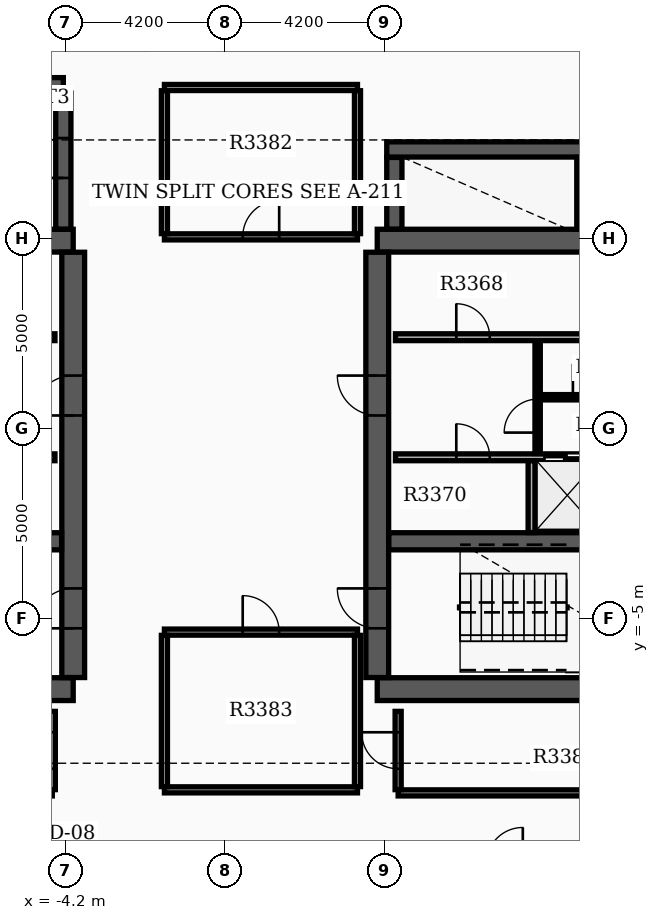
"""IFC4 building model, lengths in metres.
Left out: names, types, materials, properties, quantities, classifications, styles, units other than length and angle.
Written with IfcOpenShell. Run it as: python <this file> out.ifc"""

import sys

from ifc_helpers import new_model, si_unit, direction, frame, frame_2d, origin, place, context, subcontext, project, spatial, rectangle, extrude, element, fill, save


model = new_model("IFC4")
c1 = context("Model", 3, precision=1e-05, world=origin(), true_north=direction((0.0, 1.0)))
c2 = subcontext(c1, "Body", "Model", "MODEL_VIEW")
j1 = project(units=[si_unit("LENGTHUNIT", "METRE"), si_unit("PLANEANGLEUNIT", "RADIAN")], contexts=[c1])
p1 = place(None, origin())
s1 = spatial("IfcSite", under=j1, at=p1, CompositionType="ELEMENT")
p2 = place(p1, origin())
s2 = spatial("IfcBuilding", under=s1, at=p2, CompositionType="ELEMENT")
p3 = place(p2, frame((0.0, 0.0, 213.0)))
s3 = spatial("IfcBuildingStorey", under=s2, at=p3, CompositionType="ELEMENT", Elevation=213.0)
for number, where, z_axis, x_axis in (
    (1, (-12.4, -6.85, 0.0), (0.0, 0.0, 1.0), (1.0, 0.0, 0.0)),
    (2, (-12.4, 4.95, 0.0), (0.0, 0.0, 1.0), (1.0, 0.0, 0.0)),
):
    element("IfcWall", number, at=place(p3, frame(where, z_axis=z_axis, x_axis=x_axis)), inside=s3, PredefinedType="SHEAR", context=c2, shape_type="SweptSolid", body=[
        extrude(rectangle(XDim=8.4, YDim=0.6, at=frame_2d((4.2, 0.0))), origin(), (0.0, 0.0, 1.0), 3.7),
    ])
p4 = place(p3, frame((-4.0, -6.545, 0.0), z_axis=(0.0, 0.0, 1.0), x_axis=(0.0, 1.0, 0.0)))
e3 = element("IfcWall", 3, at=p4, inside=s3, PredefinedType="SHEAR", context=c2, shape_type="SweptSolid", body=[
    extrude(rectangle(XDim=11.19, YDim=0.6, at=frame_2d((5.595, 0.0))), origin(), (0.0, 0.0, 1.0), 3.7),
])
p5 = place(p4, frame((1.295, 0.0, 0.0)))
e4 = element("IfcOpeningElement", 4, at=p5, cuts=e3, PredefinedType="OPENING", context=c2, shape_type="SweptSolid", body=[
    extrude(rectangle(XDim=1.05, YDim=2.15, at=frame_2d((0.525, 1.075))), frame((0.0, 0.31, 0.0), z_axis=(0.0, -1.0, 0.0), x_axis=(1.0, 0.0, 0.0)), (0.0, 0.0, 1.0), 0.62),
])
p6 = place(p4, frame((6.895, 0.0, 0.0)))
e5 = element("IfcOpeningElement", 5, at=p6, cuts=e3, PredefinedType="OPENING", context=c2, shape_type="SweptSolid", body=[
    extrude(rectangle(XDim=1.05, YDim=2.15, at=frame_2d((0.525, 1.075))), frame((0.0, 0.31, 0.0), z_axis=(0.0, -1.0, 0.0), x_axis=(1.0, 0.0, 0.0)), (0.0, 0.0, 1.0), 0.62),
])
p7 = place(p3, frame((-12.095, -2.96, 0.0), z_axis=(0.0, 0.0, 1.0), x_axis=(1.0, 0.0, 0.0)))
e6 = element("IfcWall", 6, at=p7, inside=s3, PredefinedType="SHEAR", context=c2, shape_type="SweptSolid", body=[
    extrude(rectangle(XDim=7.79, YDim=0.45, at=frame_2d((3.895, 0.0))), origin(), (0.0, 0.0, 1.0), 3.7),
])
for number, where, z_axis, x_axis in (
    (7, (4.0, -6.85, 0.0), (0.0, 0.0, 1.0), (1.0, 0.0, 0.0)),
    (8, (4.0, 4.95, 0.0), (0.0, 0.0, 1.0), (1.0, 0.0, 0.0)),
):
    element("IfcWall", number, at=place(p3, frame(where, z_axis=z_axis, x_axis=x_axis)), inside=s3, PredefinedType="SHEAR", context=c2, shape_type="SweptSolid", body=[
        extrude(rectangle(XDim=8.4, YDim=0.6, at=frame_2d((4.2, 0.0))), origin(), (0.0, 0.0, 1.0), 3.7),
    ])
p8 = place(p3, frame((4.0, -6.545, 0.0), z_axis=(0.0, 0.0, 1.0), x_axis=(0.0, 1.0, 0.0)))
e9 = element("IfcWall", 9, at=p8, inside=s3, PredefinedType="SHEAR", context=c2, shape_type="SweptSolid", body=[
    extrude(rectangle(XDim=11.19, YDim=0.6, at=frame_2d((5.595, 0.0))), origin(), (0.0, 0.0, 1.0), 3.7),
])
p9 = place(p8, frame((1.295, 0.0, 0.0)))
e10 = element("IfcOpeningElement", 10, at=p9, cuts=e9, PredefinedType="OPENING", context=c2, shape_type="SweptSolid", body=[
    extrude(rectangle(XDim=1.05, YDim=2.15, at=frame_2d((0.525, 1.075))), frame((0.0, 0.31, 0.0), z_axis=(0.0, -1.0, 0.0), x_axis=(1.0, 0.0, 0.0)), (0.0, 0.0, 1.0), 0.62),
])
p10 = place(p8, frame((6.895, 0.0, 0.0)))
e11 = element("IfcOpeningElement", 11, at=p10, cuts=e9, PredefinedType="OPENING", context=c2, shape_type="SweptSolid", body=[
    extrude(rectangle(XDim=1.05, YDim=2.15, at=frame_2d((0.525, 1.075))), frame((0.0, 0.31, 0.0), z_axis=(0.0, -1.0, 0.0), x_axis=(1.0, 0.0, 0.0)), (0.0, 0.0, 1.0), 0.62),
])
p11 = place(p3, frame((4.305, -2.96, 0.0), z_axis=(0.0, 0.0, 1.0), x_axis=(1.0, 0.0, 0.0)))
e12 = element("IfcWall", 12, at=p11, inside=s3, PredefinedType="SHEAR", context=c2, shape_type="SweptSolid", body=[
    extrude(rectangle(XDim=7.79, YDim=0.45, at=frame_2d((3.895, 0.0))), origin(), (0.0, 0.0, 1.0), 3.7),
])
p12 = place(p3, frame((-12.22, 9.04, 0.0), z_axis=(0.0, 0.0, 1.0), x_axis=(1.0, 0.0, 0.0)))
e13 = element("IfcWall", 13, at=p12, inside=s3, PredefinedType="SHEAR", context=c2, shape_type="SweptSolid", body=[
    extrude(rectangle(XDim=7.96, YDim=0.4, at=frame_2d((3.98, 0.0))), origin(), (0.0, 0.0, 1.0), 3.7),
])
p13 = place(p3, frame((-4.26, 5.255, 0.0), z_axis=(0.0, 0.0, 1.0), x_axis=(0.0, 1.0, 0.0)))
e14 = element("IfcWall", 14, at=p13, inside=s3, PredefinedType="SHEAR", context=c2, shape_type="SweptSolid", body=[
    extrude(rectangle(XDim=3.58, YDim=0.4, at=frame_2d((1.79, 0.0))), origin(), (0.0, 0.0, 1.0), 3.7),
])
p14 = place(p13, frame((1.345, 0.0, 0.0)))
e15 = element("IfcOpeningElement", 15, at=p14, cuts=e14, PredefinedType="OPENING", context=c2, shape_type="SweptSolid", body=[
    extrude(rectangle(XDim=1.05, YDim=2.15, at=frame_2d((0.525, 1.075))), frame((0.0, 0.21, 0.0), z_axis=(0.0, -1.0, 0.0), x_axis=(1.0, 0.0, 0.0)), (0.0, 0.0, 1.0), 0.42),
])
p15 = place(p3, frame((4.45, 5.255, 0.0), z_axis=(0.0, 0.0, 1.0), x_axis=(0.0, 1.0, 0.0)))
e16 = element("IfcWall", 16, at=p15, inside=s3, PredefinedType="SHEAR", context=c2, shape_type="SweptSolid", body=[
    extrude(rectangle(XDim=1.885, YDim=0.4, at=frame_2d((0.942, 0.0))), origin(), (0.0, 0.0, 1.0), 3.7),
])
p16 = place(p3, frame((4.25, 7.35, 0.0), z_axis=(0.0, 0.0, 1.0), x_axis=(1.0, 0.0, 0.0)))
e17 = element("IfcWall", 17, at=p16, inside=s3, PredefinedType="SHEAR", context=c2, shape_type="SweptSolid", body=[
    extrude(rectangle(XDim=5.4, YDim=0.4, at=frame_2d((2.7, 0.0))), origin(), (0.0, 0.0, 1.0), 3.7),
])
p17 = place(p3, frame((9.45, 5.255, 0.0), z_axis=(0.0, 0.0, 1.0), x_axis=(0.0, 1.0, 0.0)))
e18 = element("IfcWall", 18, at=p17, inside=s3, PredefinedType="SHEAR", context=c2, shape_type="SweptSolid", body=[
    extrude(rectangle(XDim=1.885, YDim=0.4, at=frame_2d((0.942, 0.0))), origin(), (0.0, 0.0, 1.0), 3.7),
])
p18 = place(p3, frame((-11.9, 2.41, 0.0), z_axis=(0.0, 0.0, 1.0), x_axis=(1.0, 0.0, 0.0)))
e19 = element("IfcWall", 19, at=p18, inside=s3, PredefinedType="SOLIDWALL", context=c2, shape_type="SweptSolid", body=[
    extrude(rectangle(XDim=7.42, YDim=0.18, at=frame_2d((3.71, 0.0))), origin(), (0.0, 0.0, 1.0), 3.17),
])
p19 = place(p18, frame((0.55, 0.0, 0.0)))
e20 = element("IfcOpeningElement", 20, at=p19, cuts=e19, PredefinedType="OPENING", context=c2, shape_type="SweptSolid", body=[
    extrude(rectangle(XDim=1.1, YDim=2.15, at=frame_2d((0.55, 1.075))), frame((0.0, 0.1, 0.0), z_axis=(0.0, -1.0, 0.0), x_axis=(1.0, 0.0, 0.0)), (0.0, 0.0, 1.0), 0.2),
])
p20 = place(p18, frame((4.9, 0.0, 0.0)))
e21 = element("IfcOpeningElement", 21, at=p20, cuts=e19, PredefinedType="OPENING", context=c2, shape_type="SweptSolid", body=[
    extrude(rectangle(XDim=0.88, YDim=2.1, at=frame_2d((0.44, 1.05))), frame((0.0, 0.1, 0.0), z_axis=(0.0, -1.0, 0.0), x_axis=(1.0, 0.0, 0.0)), (0.0, 0.0, 1.0), 0.2),
])
p21 = place(p3, frame((4.48, 2.41, 0.0), z_axis=(0.0, 0.0, 1.0), x_axis=(1.0, 0.0, 0.0)))
e22 = element("IfcWall", 22, at=p21, inside=s3, PredefinedType="SOLIDWALL", context=c2, shape_type="SweptSolid", body=[
    extrude(rectangle(XDim=7.42, YDim=0.18, at=frame_2d((3.71, 0.0))), origin(), (0.0, 0.0, 1.0), 3.17),
])
p22 = place(p21, frame((5.67, 0.0, 0.0)))
e23 = element("IfcOpeningElement", 23, at=p22, cuts=e22, PredefinedType="OPENING", context=c2, shape_type="SweptSolid", body=[
    extrude(rectangle(XDim=1.1, YDim=2.15, at=frame_2d((0.55, 1.075))), frame((0.0, 0.1, 0.0), z_axis=(0.0, -1.0, 0.0), x_axis=(1.0, 0.0, 0.0)), (0.0, 0.0, 1.0), 0.2),
])
p23 = place(p21, frame((1.6, 0.0, 0.0)))
e24 = element("IfcOpeningElement", 24, at=p23, cuts=e22, PredefinedType="OPENING", context=c2, shape_type="SweptSolid", body=[
    extrude(rectangle(XDim=0.88, YDim=2.1, at=frame_2d((0.44, 1.05))), frame((0.0, 0.1, 0.0), z_axis=(0.0, -1.0, 0.0), x_axis=(1.0, 0.0, 0.0)), (0.0, 0.0, 1.0), 0.2),
])
p24 = place(p3, frame((-11.9, -0.75, 0.0), z_axis=(0.0, 0.0, 1.0), x_axis=(1.0, 0.0, 0.0)))
e25 = element("IfcWall", 25, at=p24, inside=s3, PredefinedType="SOLIDWALL", context=c2, shape_type="SweptSolid", body=[
    extrude(rectangle(XDim=7.42, YDim=0.18, at=frame_2d((3.71, 0.0))), origin(), (0.0, 0.0, 1.0), 3.17),
])
p25 = place(p24, frame((5.75, 0.0, 0.0)))
e26 = element("IfcOpeningElement", 26, at=p25, cuts=e25, PredefinedType="OPENING", context=c2, shape_type="SweptSolid", body=[
    extrude(rectangle(XDim=1.1, YDim=2.15, at=frame_2d((0.55, 1.075))), frame((0.0, 0.1, 0.0), z_axis=(0.0, -1.0, 0.0), x_axis=(1.0, 0.0, 0.0)), (0.0, 0.0, 1.0), 0.2),
])
p26 = place(p24, frame((1.6, 0.0, 0.0)))
e27 = element("IfcOpeningElement", 27, at=p26, cuts=e25, PredefinedType="OPENING", context=c2, shape_type="SweptSolid", body=[
    extrude(rectangle(XDim=0.88, YDim=2.1, at=frame_2d((0.44, 1.05))), frame((0.0, 0.1, 0.0), z_axis=(0.0, -1.0, 0.0), x_axis=(1.0, 0.0, 0.0)), (0.0, 0.0, 1.0), 0.2),
])
p27 = place(p3, frame((4.48, -0.75, 0.0), z_axis=(0.0, 0.0, 1.0), x_axis=(1.0, 0.0, 0.0)))
e28 = element("IfcWall", 28, at=p27, inside=s3, PredefinedType="SOLIDWALL", context=c2, shape_type="SweptSolid", body=[
    extrude(rectangle(XDim=7.42, YDim=0.18, at=frame_2d((3.71, 0.0))), origin(), (0.0, 0.0, 1.0), 3.17),
])
p28 = place(p27, frame((3.92, 0.0, 0.0)))
e29 = element("IfcOpeningElement", 29, at=p28, cuts=e28, PredefinedType="OPENING", context=c2, shape_type="SweptSolid", body=[
    extrude(rectangle(XDim=1.1, YDim=2.15, at=frame_2d((0.55, 1.075))), frame((0.0, 0.1, 0.0), z_axis=(0.0, -1.0, 0.0), x_axis=(1.0, 0.0, 0.0)), (0.0, 0.0, 1.0), 0.2),
])
p29 = place(p27, frame((5.82, 0.0, 0.0)))
e30 = element("IfcOpeningElement", 30, at=p29, cuts=e28, PredefinedType="OPENING", context=c2, shape_type="SweptSolid", body=[
    extrude(rectangle(XDim=1.1, YDim=2.15, at=frame_2d((0.55, 1.075))), frame((0.0, 0.1, 0.0), z_axis=(0.0, -1.0, 0.0), x_axis=(1.0, 0.0, 0.0)), (0.0, 0.0, 1.0), 0.2),
])
p30 = place(p27, frame((1.6, 0.0, 0.0)))
e31 = element("IfcOpeningElement", 31, at=p30, cuts=e28, PredefinedType="OPENING", context=c2, shape_type="SweptSolid", body=[
    extrude(rectangle(XDim=0.88, YDim=2.1, at=frame_2d((0.44, 1.05))), frame((0.0, 0.1, 0.0), z_axis=(0.0, -1.0, 0.0), x_axis=(1.0, 0.0, 0.0)), (0.0, 0.0, 1.0), 0.2),
])
p31 = place(p3, frame((8.06, -2.73, 0.0), z_axis=(0.0, 0.0, 1.0), x_axis=(0.0, 1.0, 0.0)))
e32 = element("IfcWall", 32, at=p31, inside=s3, PredefinedType="SOLIDWALL", context=c2, shape_type="SweptSolid", body=[
    extrude(rectangle(XDim=1.89, YDim=0.18, at=frame_2d((0.945, 0.0))), origin(), (0.0, 0.0, 1.0), 3.17),
])
p32 = place(p3, frame((8.22, -0.65, 0.0), z_axis=(0.0, 0.0, 1.0), x_axis=(0.0, 1.0, 0.0)))
e33 = element("IfcWall", 33, at=p32, inside=s3, PredefinedType="SOLIDWALL", context=c2, shape_type="SweptSolid", body=[
    extrude(rectangle(XDim=2.96, YDim=0.14, at=frame_2d((1.48, 0.0))), origin(), (0.0, 0.0, 1.0), 3.17),
])
p33 = place(p32, frame((0.55, 0.0, 0.0)))
e34 = element("IfcOpeningElement", 34, at=p33, cuts=e33, PredefinedType="OPENING", context=c2, shape_type="SweptSolid", body=[
    extrude(rectangle(XDim=0.88, YDim=2.1, at=frame_2d((0.44, 1.05))), frame((0.0, 0.08, 0.0), z_axis=(0.0, -1.0, 0.0), x_axis=(1.0, 0.0, 0.0)), (0.0, 0.0, 1.0), 0.16),
])
p34 = place(p3, frame((8.298, 0.83, 0.0), z_axis=(0.0, 0.0, 1.0), x_axis=(1.0, 0.0, 0.0)))
e35 = element("IfcWall", 35, at=p34, inside=s3, PredefinedType="PARTITIONING", context=c2, shape_type="SweptSolid", body=[
    extrude(rectangle(XDim=3.552, YDim=0.14, at=frame_2d((1.776, 0.0))), origin(), (0.0, 0.0, 1.0), 3.17),
])
p35 = place(p34, frame((0.85, 0.0, 0.0)))
e36 = element("IfcOpeningElement", 36, at=p35, cuts=e35, PredefinedType="OPENING", context=c2, shape_type="SweptSolid", body=[
    extrude(rectangle(XDim=0.88, YDim=2.1, at=frame_2d((0.44, 1.05))), frame((0.0, 0.08, 0.0), z_axis=(0.0, -1.0, 0.0), x_axis=(1.0, 0.0, 0.0)), (0.0, 0.0, 1.0), 0.16),
])
p36 = place(p3, frame((-1.6, 5.05, 0.0), z_axis=(0.0, 0.0, 1.0), x_axis=(1.0, 0.0, 0.0)))
e37 = element("IfcWall", 37, at=p36, inside=s3, PredefinedType="PARTITIONING", context=c2, shape_type="SweptSolid", body=[
    extrude(rectangle(XDim=5.08, YDim=0.16, at=frame_2d((2.54, 0.0))), origin(), (0.0, 0.0, 1.0), 3.17),
])
p37 = place(p36, frame((2.06, 0.0, 0.0)))
e38 = element("IfcOpeningElement", 38, at=p37, cuts=e37, PredefinedType="OPENING", context=c2, shape_type="SweptSolid", body=[
    extrude(rectangle(XDim=0.96, YDim=2.15, at=frame_2d((0.48, 1.075))), frame((0.0, 0.09, 0.0), z_axis=(0.0, -1.0, 0.0), x_axis=(1.0, 0.0, 0.0)), (0.0, 0.0, 1.0), 0.18),
])
p38 = place(p3, frame((-1.6, 8.98, 0.0), z_axis=(0.0, 0.0, 1.0), x_axis=(1.0, 0.0, 0.0)))
e39 = element("IfcWall", 39, at=p38, inside=s3, PredefinedType="PARTITIONING", context=c2, shape_type="SweptSolid", body=[
    extrude(rectangle(XDim=5.08, YDim=0.16, at=frame_2d((2.54, 0.0))), origin(), (0.0, 0.0, 1.0), 3.17),
])
for number, where, z_axis, x_axis in (
    (40, (-1.6, 5.135, 0.0), (0.0, 0.0, 1.0), (0.0, 1.0, 0.0)),
    (41, (3.48, 5.135, 0.0), (0.0, 0.0, 1.0), (0.0, 1.0, 0.0)),
):
    element("IfcWall", number, at=place(p3, frame(where, z_axis=z_axis, x_axis=x_axis)), inside=s3, PredefinedType="PARTITIONING", context=c2, shape_type="SweptSolid", body=[
        extrude(rectangle(XDim=3.76, YDim=0.16, at=frame_2d((1.88, 0.0))), origin(), (0.0, 0.0, 1.0), 3.17),
    ])
p39 = place(p3, frame((-1.6, -9.5, 0.0), z_axis=(0.0, 0.0, 1.0), x_axis=(1.0, 0.0, 0.0)))
e42 = element("IfcWall", 42, at=p39, inside=s3, PredefinedType="PARTITIONING", context=c2, shape_type="SweptSolid", body=[
    extrude(rectangle(XDim=5.08, YDim=0.16, at=frame_2d((2.54, 0.0))), origin(), (0.0, 0.0, 1.0), 3.17),
])
p40 = place(p3, frame((-1.6, -5.35, 0.0), z_axis=(0.0, 0.0, 1.0), x_axis=(1.0, 0.0, 0.0)))
e43 = element("IfcWall", 43, at=p40, inside=s3, PredefinedType="PARTITIONING", context=c2, shape_type="SweptSolid", body=[
    extrude(rectangle(XDim=5.08, YDim=0.16, at=frame_2d((2.54, 0.0))), origin(), (0.0, 0.0, 1.0), 3.17),
])
p41 = place(p40, frame((2.06, 0.0, 0.0)))
e44 = element("IfcOpeningElement", 44, at=p41, cuts=e43, PredefinedType="OPENING", context=c2, shape_type="SweptSolid", body=[
    extrude(rectangle(XDim=0.96, YDim=2.15, at=frame_2d((0.48, 1.075))), frame((0.0, 0.09, 0.0), z_axis=(0.0, -1.0, 0.0), x_axis=(1.0, 0.0, 0.0)), (0.0, 0.0, 1.0), 0.18),
])
for number, where, z_axis, x_axis in (
    (45, (-1.6, -9.415, 0.0), (0.0, 0.0, 1.0), (0.0, 1.0, 0.0)),
    (46, (3.48, -9.415, 0.0), (0.0, 0.0, 1.0), (0.0, 1.0, 0.0)),
):
    element("IfcWall", number, at=place(p3, frame(where, z_axis=z_axis, x_axis=x_axis)), inside=s3, PredefinedType="PARTITIONING", context=c2, shape_type="SweptSolid", body=[
        extrude(rectangle(XDim=3.98, YDim=0.16, at=frame_2d((1.99, 0.0))), origin(), (0.0, 0.0, 1.0), 3.17),
    ])
p42 = place(p3, frame((4.55, -9.58, 0.0), z_axis=(0.0, 0.0, 1.0), x_axis=(1.0, 0.0, 0.0)))
e47 = element("IfcWall", 47, at=p42, inside=s3, PredefinedType="PARTITIONING", context=c2, shape_type="SweptSolid", body=[
    extrude(rectangle(XDim=8.1, YDim=0.16, at=frame_2d((4.05, 0.0))), origin(), (0.0, 0.0, 1.0), 3.17),
])
p43 = place(p3, frame((4.55, -9.495, 0.0), z_axis=(0.0, 0.0, 1.0), x_axis=(0.0, 1.0, 0.0)))
e48 = element("IfcWall", 48, at=p43, inside=s3, PredefinedType="PARTITIONING", context=c2, shape_type="SweptSolid", body=[
    extrude(rectangle(XDim=2.06, YDim=0.16, at=frame_2d((1.03, 0.0))), origin(), (0.0, 0.0, 1.0), 3.17),
])
p44 = place(p43, frame((0.55, 0.0, 0.0)))
e49 = element("IfcOpeningElement", 49, at=p44, cuts=e48, PredefinedType="OPENING", context=c2, shape_type="SweptSolid", body=[
    extrude(rectangle(XDim=0.96, YDim=2.15, at=frame_2d((0.48, 1.075))), frame((0.0, 0.09, 0.0), z_axis=(0.0, -1.0, 0.0), x_axis=(1.0, 0.0, 0.0)), (0.0, 0.0, 1.0), 0.18),
])
p45 = place(p3, frame((-4.55, -9.495, 0.0), z_axis=(0.0, 0.0, 1.0), x_axis=(0.0, 1.0, 0.0)))
e50 = element("IfcWall", 50, at=p45, inside=s3, PredefinedType="PARTITIONING", context=c2, shape_type="SweptSolid", body=[
    extrude(rectangle(XDim=2.06, YDim=0.16, at=frame_2d((1.03, 0.0))), origin(), (0.0, 0.0, 1.0), 3.17),
])
p46 = place(p45, frame((0.55, 0.0, 0.0)))
e51 = element("IfcOpeningElement", 51, at=p46, cuts=e50, PredefinedType="OPENING", context=c2, shape_type="SweptSolid", body=[
    extrude(rectangle(XDim=0.96, YDim=2.15, at=frame_2d((0.48, 1.075))), frame((0.0, 0.09, 0.0), z_axis=(0.0, -1.0, 0.0), x_axis=(1.0, 0.0, 0.0)), (0.0, 0.0, 1.0), 0.18),
])
p47 = place(p5, origin())
e52 = element("IfcDoor", 52, at=p47, inside=s3, OperationType="SINGLE_SWING_LEFT", PredefinedType="DOOR", context=c2, shape_type="SweptSolid", body=[
    extrude(rectangle(XDim=1.05, YDim=2.15, at=frame_2d((0.525, 1.075))), frame((0.0, 0.025, 0.0), z_axis=(0.0, -1.0, 0.0), x_axis=(1.0, 0.0, 0.0)), (0.0, 0.0, 1.0), 0.05),
])
fill(e4, e52)
p48 = place(p9, origin())
e53 = element("IfcDoor", 53, at=p48, inside=s3, OperationType="SINGLE_SWING_RIGHT", PredefinedType="DOOR", context=c2, shape_type="SweptSolid", body=[
    extrude(rectangle(XDim=1.05, YDim=2.15, at=frame_2d((0.525, 1.075))), frame((0.0, 0.025, 0.0), z_axis=(0.0, -1.0, 0.0), x_axis=(1.0, 0.0, 0.0)), (0.0, 0.0, 1.0), 0.05),
])
fill(e10, e53)
p49 = place(p6, origin())
e54 = element("IfcDoor", 54, at=p49, inside=s3, OperationType="SINGLE_SWING_LEFT", PredefinedType="DOOR", context=c2, shape_type="SweptSolid", body=[
    extrude(rectangle(XDim=1.05, YDim=2.15, at=frame_2d((0.525, 1.075))), frame((0.0, 0.025, 0.0), z_axis=(0.0, -1.0, 0.0), x_axis=(1.0, 0.0, 0.0)), (0.0, 0.0, 1.0), 0.05),
])
fill(e5, e54)
p50 = place(p10, origin())
e55 = element("IfcDoor", 55, at=p50, inside=s3, OperationType="SINGLE_SWING_RIGHT", PredefinedType="DOOR", context=c2, shape_type="SweptSolid", body=[
    extrude(rectangle(XDim=1.05, YDim=2.15, at=frame_2d((0.525, 1.075))), frame((0.0, 0.025, 0.0), z_axis=(0.0, -1.0, 0.0), x_axis=(1.0, 0.0, 0.0)), (0.0, 0.0, 1.0), 0.05),
])
fill(e11, e55)
p51 = place(p14, origin())
e56 = element("IfcDoor", 56, at=p51, inside=s3, OperationType="SINGLE_SWING_LEFT", PredefinedType="DOOR", context=c2, shape_type="SweptSolid", body=[
    extrude(rectangle(XDim=1.05, YDim=2.15, at=frame_2d((0.525, 1.075))), frame((0.0, 0.025, 0.0), z_axis=(0.0, -1.0, 0.0), x_axis=(1.0, 0.0, 0.0)), (0.0, 0.0, 1.0), 0.05),
])
fill(e15, e56)
p52 = place(p28, origin())
e57 = element("IfcDoor", 57, at=p52, inside=s3, OperationType="DOUBLE_DOOR_SLIDING", PredefinedType="DOOR", context=c2, shape_type="SweptSolid", body=[
    extrude(rectangle(XDim=1.1, YDim=2.15, at=frame_2d((0.55, 1.075))), frame((0.0, 0.025, 0.0), z_axis=(0.0, -1.0, 0.0), x_axis=(1.0, 0.0, 0.0)), (0.0, 0.0, 1.0), 0.05),
])
fill(e29, e57)
p53 = place(p23, origin())
e58 = element("IfcDoor", 58, at=p53, inside=s3, OperationType="SINGLE_SWING_LEFT", PredefinedType="DOOR", context=c2, shape_type="SweptSolid", body=[
    extrude(rectangle(XDim=0.88, YDim=2.1, at=frame_2d((0.44, 1.05))), frame((0.0, 0.025, 0.0), z_axis=(0.0, -1.0, 0.0), x_axis=(1.0, 0.0, 0.0)), (0.0, 0.0, 1.0), 0.05),
])
fill(e24, e58)
p54 = place(p30, origin())
e59 = element("IfcDoor", 59, at=p54, inside=s3, OperationType="SINGLE_SWING_LEFT", PredefinedType="DOOR", context=c2, shape_type="SweptSolid", body=[
    extrude(rectangle(XDim=0.88, YDim=2.1, at=frame_2d((0.44, 1.05))), frame((0.0, 0.025, 0.0), z_axis=(0.0, -1.0, 0.0), x_axis=(1.0, 0.0, 0.0)), (0.0, 0.0, 1.0), 0.05),
])
fill(e31, e59)
p55 = place(p33, origin())
e60 = element("IfcDoor", 60, at=p55, inside=s3, OperationType="SINGLE_SWING_LEFT", PredefinedType="DOOR", context=c2, shape_type="SweptSolid", body=[
    extrude(rectangle(XDim=0.88, YDim=2.1, at=frame_2d((0.44, 1.05))), frame((0.0, 0.025, 0.0), z_axis=(0.0, -1.0, 0.0), x_axis=(1.0, 0.0, 0.0)), (0.0, 0.0, 1.0), 0.05),
])
fill(e34, e60)
p56 = place(p35, origin())
e61 = element("IfcDoor", 61, at=p56, inside=s3, OperationType="SINGLE_SWING_LEFT", PredefinedType="DOOR", context=c2, shape_type="SweptSolid", body=[
    extrude(rectangle(XDim=0.88, YDim=2.1, at=frame_2d((0.44, 1.05))), frame((0.0, 0.025, 0.0), z_axis=(0.0, -1.0, 0.0), x_axis=(1.0, 0.0, 0.0)), (0.0, 0.0, 1.0), 0.05),
])
fill(e36, e61)
p57 = place(p37, origin())
e62 = element("IfcDoor", 62, at=p57, inside=s3, OperationType="SINGLE_SWING_RIGHT", PredefinedType="DOOR", context=c2, shape_type="SweptSolid", body=[
    extrude(rectangle(XDim=0.96, YDim=2.15, at=frame_2d((0.48, 1.075))), frame((0.0, 0.025, 0.0), z_axis=(0.0, -1.0, 0.0), x_axis=(1.0, 0.0, 0.0)), (0.0, 0.0, 1.0), 0.05),
])
fill(e38, e62)
p58 = place(p41, origin())
e63 = element("IfcDoor", 63, at=p58, inside=s3, OperationType="SINGLE_SWING_LEFT", PredefinedType="DOOR", context=c2, shape_type="SweptSolid", body=[
    extrude(rectangle(XDim=0.96, YDim=2.15, at=frame_2d((0.48, 1.075))), frame((0.0, 0.025, 0.0), z_axis=(0.0, -1.0, 0.0), x_axis=(1.0, 0.0, 0.0)), (0.0, 0.0, 1.0), 0.05),
])
fill(e44, e63)
p59 = place(p44, origin())
e64 = element("IfcDoor", 64, at=p59, inside=s3, OperationType="SINGLE_SWING_RIGHT", PredefinedType="DOOR", context=c2, shape_type="SweptSolid", body=[
    extrude(rectangle(XDim=0.96, YDim=2.15, at=frame_2d((0.48, 1.075))), frame((0.0, 0.025, 0.0), z_axis=(0.0, -1.0, 0.0), x_axis=(1.0, 0.0, 0.0)), (0.0, 0.0, 1.0), 0.05),
])
fill(e49, e64)
p60 = place(p46, origin())
e65 = element("IfcDoor", 65, at=p60, inside=s3, OperationType="SINGLE_SWING_LEFT", PredefinedType="DOOR", context=c2, shape_type="SweptSolid", body=[
    extrude(rectangle(XDim=0.96, YDim=2.15, at=frame_2d((0.48, 1.075))), frame((0.0, 0.025, 0.0), z_axis=(0.0, -1.0, 0.0), x_axis=(1.0, 0.0, 0.0)), (0.0, 0.0, 1.0), 0.05),
])
fill(e51, e65)
save(model, sys.argv[1])
